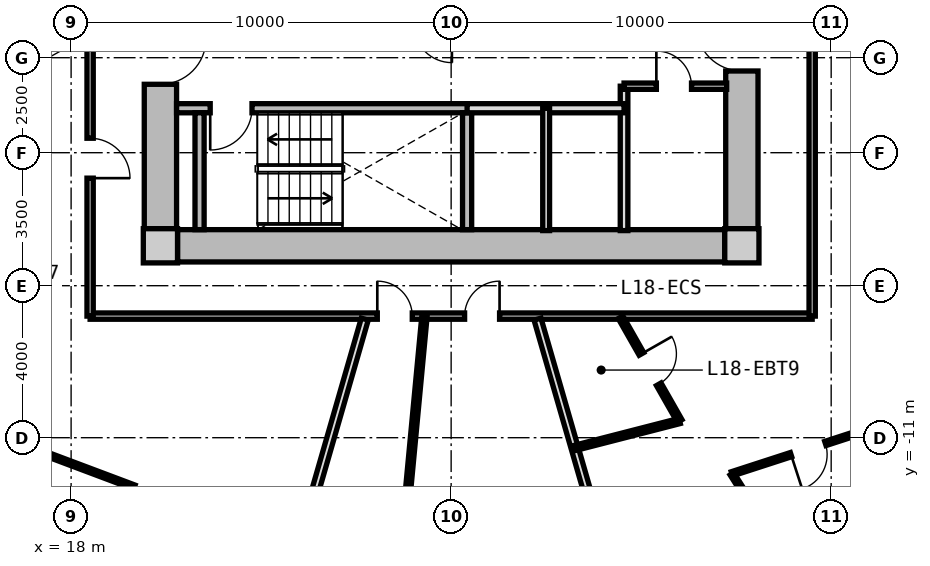
"""IFC4 building model, lengths in metres.
Left out: names, types, materials, properties, quantities, classifications, styles, units other than length and angle.
Written with IfcOpenShell. Run it as: python <this file> out.ifc"""

import sys

from ifc_helpers import new_model, si_unit, direction, frame, frame_2d, origin, origin_2d, place, context, subcontext, project, spatial, rectangle, extrude, source, transform, mapped, element, fill, save


model = new_model("IFC4")
c1 = context("Model", 3, precision=1e-05, world=origin(), true_north=direction((0.0, 1.0)))
c2 = subcontext(c1, "Body", "Model", "MODEL_VIEW")
j1 = project(units=[si_unit("LENGTHUNIT", "METRE"), si_unit("PLANEANGLEUNIT", "RADIAN")], contexts=[c1])
p1 = place(None, origin())
s1 = spatial("IfcSite", under=j1, at=p1, CompositionType="ELEMENT")
p2 = place(p1, origin())
s2 = spatial("IfcBuilding", under=s1, at=p2, CompositionType="ELEMENT")
p3 = place(p2, frame((0.0, 0.0, 61.25)))
s3 = spatial("IfcBuildingStorey", under=s2, at=p3, CompositionType="ELEMENT", Elevation=61.25)
m1 = source(origin(), c2, "Body", "SweptSolid", [
    extrude(rectangle(XDim=0.9, YDim=0.9, at=origin_2d()), origin(), (0.0, 0.0, 1.0), 3.05),
])
for number, where, z_axis, x_axis in (
    (1, (20.35, -5.95, 0.0), (0.0, 0.0, 1.0), (1.0, 0.0, 0.0)),
    (2, (35.65, -5.95, 0.0), (0.0, 0.0, 1.0), (1.0, 0.0, 0.0)),
):
    element("IfcColumn", number, at=place(p3, frame(where, z_axis=z_axis, x_axis=x_axis)), inside=s3, PredefinedType="COLUMN", context=c2, shape_type="MappedRepresentation", body=[
        mapped(m1, transform((0.0, 0.0, 0.0), x_axis=(1.0, 0.0, 0.0), y_axis=(0.0, 1.0, 0.0), z_axis=(0.0, 0.0, 1.0), scale=1.0)),
    ])
m2 = source(origin(), c2, "Body", "SweptSolid", [
    extrude(rectangle(XDim=14.4, YDim=0.85, at=frame_2d((7.2, 0.0))), origin(), (0.0, 0.0, 1.0), 2.79),
])
p4 = place(p3, frame((35.2, -5.95, 0.0), z_axis=(0.0, 0.0, 1.0), x_axis=(-1.0, 0.0, 0.0)))
e3 = element("IfcWall", 3, at=p4, inside=s3, PredefinedType="SHEAR", context=c2, shape_type="MappedRepresentation", body=[
    mapped(m2, transform((0.0, 0.0, 0.0), x_axis=(1.0, 0.0, 0.0), y_axis=(0.0, 1.0, 0.0), z_axis=(0.0, 0.0, 1.0), scale=1.0)),
])
m3 = source(origin(), c2, "Body", "SweptSolid", [
    extrude(rectangle(XDim=11.0, YDim=0.85, at=frame_2d((5.5, 0.0))), origin(), (0.0, 0.0, 1.0), 2.79),
])
p5 = place(p3, frame((20.35, -5.5, 0.0), z_axis=(0.0, 0.0, 1.0), x_axis=(0.0, 1.0, 0.0)))
e4 = element("IfcWall", 4, at=p5, inside=s3, PredefinedType="SHEAR", context=c2, shape_type="MappedRepresentation", body=[
    mapped(m3, transform((0.0, 0.0, 0.0), x_axis=(1.0, 0.0, 0.0), y_axis=(0.0, 1.0, 0.0), z_axis=(0.0, 0.0, 1.0), scale=1.0)),
])
p6 = place(p5, frame((3.8, 0.0, 0.0)))
e5 = element("IfcOpeningElement", 5, at=p6, cuts=e4, PredefinedType="OPENING", context=c2, shape_type="SweptSolid", body=[
    extrude(rectangle(XDim=1.2, YDim=2.15, at=frame_2d((0.6, 1.075))), frame((0.0, 0.435, 0.0), z_axis=(0.0, -1.0, 0.0), x_axis=(1.0, 0.0, 0.0)), (0.0, 0.0, 1.0), 0.87),
])
p7 = place(p3, frame((35.65, 5.5, 0.0), z_axis=(0.0, 0.0, 1.0), x_axis=(0.0, -1.0, 0.0)))
e6 = element("IfcWall", 6, at=p7, inside=s3, PredefinedType="SHEAR", context=c2, shape_type="MappedRepresentation", body=[
    mapped(m3, transform((0.0, 0.0, 0.0), x_axis=(1.0, 0.0, 0.0), y_axis=(0.0, 1.0, 0.0), z_axis=(0.0, 0.0, 1.0), scale=1.0)),
])
p8 = place(p7, frame((5.65, 0.0, 0.0)))
e7 = element("IfcOpeningElement", 7, at=p8, cuts=e6, PredefinedType="OPENING", context=c2, shape_type="SweptSolid", body=[
    extrude(rectangle(XDim=1.2, YDim=2.15, at=frame_2d((0.6, 1.075))), frame((0.0, 0.435, 0.0), z_axis=(0.0, -1.0, 0.0), x_axis=(1.0, 0.0, 0.0)), (0.0, 0.0, 1.0), 0.87),
])
m4 = source(origin(), c2, "Body", "SweptSolid", [
    extrude(rectangle(XDim=7.765, YDim=0.24, at=frame_2d((3.883, 0.0))), origin(), (0.0, 0.0, 1.0), 2.79),
])
p9 = place(p3, frame((20.775, -2.33, 0.0), z_axis=(0.0, 0.0, 1.0), x_axis=(1.0, 0.0, 0.0)))
e8 = element("IfcWall", 8, at=p9, inside=s3, PredefinedType="PARTITIONING", context=c2, shape_type="MappedRepresentation", body=[
    mapped(m4, transform((0.0, 0.0, 0.0), x_axis=(1.0, 0.0, 0.0), y_axis=(0.0, 1.0, 0.0), z_axis=(0.0, 0.0, 1.0), scale=1.0)),
])
p10 = place(p9, frame((0.885, 0.0, 0.0)))
e9 = element("IfcOpeningElement", 9, at=p10, cuts=e8, PredefinedType="OPENING", context=c2, shape_type="SweptSolid", body=[
    extrude(rectangle(XDim=1.1, YDim=2.15, at=frame_2d((0.55, 1.075))), frame((0.0, 0.13, 0.0), z_axis=(0.0, -1.0, 0.0), x_axis=(1.0, 0.0, 0.0)), (0.0, 0.0, 1.0), 0.26),
])
m5 = source(origin(), c2, "Body", "SweptSolid", [
    extrude(rectangle(XDim=3.075, YDim=0.24, at=frame_2d((1.538, 0.0))), origin(), (0.0, 0.0, 1.0), 2.79),
])
for number, where, z_axis, x_axis in (
    (10, (21.38, -5.525, 0.0), (0.0, 0.0, 1.0), (0.0, 1.0, 0.0)),
    (11, (28.42, -5.525, 0.0), (0.0, 0.0, 1.0), (0.0, 1.0, 0.0)),
):
    element("IfcWall", number, at=place(p3, frame(where, z_axis=z_axis, x_axis=x_axis)), inside=s3, PredefinedType="PARTITIONING", context=c2, shape_type="MappedRepresentation", body=[
        mapped(m5, transform((0.0, 0.0, 0.0), x_axis=(1.0, 0.0, 0.0), y_axis=(0.0, 1.0, 0.0), z_axis=(0.0, 0.0, 1.0), scale=1.0)),
    ])
m6 = source(origin(), c2, "Body", "SweptSolid", [
    extrude(rectangle(XDim=3.8, YDim=0.2, at=frame_2d((1.9, 0.0))), origin(), (0.0, 0.0, 1.0), 2.775),
])
p11 = place(p3, frame((32.55, -5.55, 0.0), z_axis=(0.0, 0.0, 1.0), x_axis=(0.0, 1.0, 0.0)))
e12 = element("IfcWall", 12, at=p11, inside=s3, PredefinedType="PARTITIONING", context=c2, shape_type="MappedRepresentation", body=[
    mapped(m6, transform((0.0, 0.0, 0.0), x_axis=(1.0, 0.0, 0.0), y_axis=(0.0, 1.0, 0.0), z_axis=(0.0, 0.0, 1.0), scale=1.0)),
])
m7 = source(origin(), c2, "Body", "SweptSolid", [
    extrude(rectangle(XDim=4.13, YDim=0.24, at=frame_2d((2.065, 0.0))), origin(), (0.0, 0.0, 1.0), 2.775),
])
p12 = place(p3, frame((28.42, -2.33, 0.0), z_axis=(0.0, 0.0, 1.0), x_axis=(1.0, 0.0, 0.0)))
e13 = element("IfcWall", 13, at=p12, inside=s3, PredefinedType="PARTITIONING", context=c2, shape_type="MappedRepresentation", body=[
    mapped(m7, transform((0.0, 0.0, 0.0), x_axis=(1.0, 0.0, 0.0), y_axis=(0.0, 1.0, 0.0), z_axis=(0.0, 0.0, 1.0), scale=1.0)),
])
m8 = source(origin(), c2, "Body", "SweptSolid", [
    extrude(rectangle(XDim=3.22, YDim=0.18, at=frame_2d((1.61, 0.0))), origin(), (0.0, 0.0, 1.0), 2.775),
])
p13 = place(p3, frame((30.5, -5.55, 0.0), z_axis=(0.0, 0.0, 1.0), x_axis=(0.0, 1.0, 0.0)))
e14 = element("IfcWall", 14, at=p13, inside=s3, PredefinedType="PARTITIONING", context=c2, shape_type="MappedRepresentation", body=[
    mapped(m8, transform((0.0, 0.0, 0.0), x_axis=(1.0, 0.0, 0.0), y_axis=(0.0, 1.0, 0.0), z_axis=(0.0, 0.0, 1.0), scale=1.0)),
])
m9 = source(origin(), c2, "Body", "SweptSolid", [
    extrude(rectangle(XDim=2.7, YDim=0.165, at=frame_2d((1.35, 0.0))), origin(), (0.0, 0.0, 1.0), 2.775),
])
p14 = place(p3, frame((32.55, -1.75, 0.0), z_axis=(0.0, 0.0, 1.0), x_axis=(1.0, 0.0, 0.0)))
e15 = element("IfcWall", 15, at=p14, inside=s3, PredefinedType="PARTITIONING", context=c2, shape_type="MappedRepresentation", body=[
    mapped(m9, transform((0.0, 0.0, 0.0), x_axis=(1.0, 0.0, 0.0), y_axis=(0.0, 1.0, 0.0), z_axis=(0.0, 0.0, 1.0), scale=1.0)),
])
p15 = place(p14, frame((0.85, 0.0, 0.0)))
e16 = element("IfcOpeningElement", 16, at=p15, cuts=e15, PredefinedType="OPENING", context=c2, shape_type="SweptSolid", body=[
    extrude(rectangle(XDim=0.925, YDim=2.1, at=frame_2d((0.462, 1.05))), frame((0.0, 0.093, 0.0), z_axis=(0.0, -1.0, 0.0), x_axis=(1.0, 0.0, 0.0)), (0.0, 0.0, 1.0), 0.185),
])
m10 = source(origin(), c2, "Body", "SweptSolid", [
    extrude(rectangle(XDim=19.0, YDim=0.165, at=frame_2d((9.5, 0.0))), origin(), (0.0, 0.0, 1.0), 2.775),
])
p16 = place(p3, frame((37.5, -7.8, 0.0), z_axis=(0.0, 0.0, 1.0), x_axis=(-1.0, 0.0, 0.0)))
e17 = element("IfcWall", 17, at=p16, inside=s3, PredefinedType="PARTITIONING", context=c2, shape_type="MappedRepresentation", body=[
    mapped(m10, transform((0.0, 0.0, 0.0), x_axis=(1.0, 0.0, 0.0), y_axis=(0.0, 1.0, 0.0), z_axis=(0.0, 0.0, 1.0), scale=1.0)),
])
p17 = place(p16, frame((10.523, 0.0, 0.0)))
e18 = element("IfcOpeningElement", 18, at=p17, cuts=e17, PredefinedType="OPENING", context=c2, shape_type="SweptSolid", body=[
    extrude(rectangle(XDim=0.92, YDim=2.1, at=frame_2d((0.46, 1.05))), frame((0.0, 0.093, 0.0), z_axis=(0.0, -1.0, 0.0), x_axis=(1.0, 0.0, 0.0)), (0.0, 0.0, 1.0), 0.185),
])
p18 = place(p16, frame((8.226, 0.0, 0.0)))
e19 = element("IfcOpeningElement", 19, at=p18, cuts=e17, PredefinedType="OPENING", context=c2, shape_type="SweptSolid", body=[
    extrude(rectangle(XDim=0.92, YDim=2.1, at=frame_2d((0.46, 1.05))), frame((0.0, 0.093, 0.0), z_axis=(0.0, -1.0, 0.0), x_axis=(1.0, 0.0, 0.0)), (0.0, 0.0, 1.0), 0.185),
])
m11 = source(origin(), c2, "Body", "SweptSolid", [
    extrude(rectangle(XDim=15.6, YDim=0.165, at=frame_2d((7.8, 0.0))), origin(), (0.0, 0.0, 1.0), 2.775),
])
p19 = place(p3, frame((18.5, -7.8, 0.0), z_axis=(0.0, 0.0, 1.0), x_axis=(0.0, 1.0, 0.0)))
e20 = element("IfcWall", 20, at=p19, inside=s3, PredefinedType="PARTITIONING", context=c2, shape_type="MappedRepresentation", body=[
    mapped(m11, transform((0.0, 0.0, 0.0), x_axis=(1.0, 0.0, 0.0), y_axis=(0.0, 1.0, 0.0), z_axis=(0.0, 0.0, 1.0), scale=1.0)),
])
p20 = place(p19, frame((3.63, 0.0, 0.0)))
e21 = element("IfcOpeningElement", 21, at=p20, cuts=e20, PredefinedType="OPENING", context=c2, shape_type="SweptSolid", body=[
    extrude(rectangle(XDim=1.05, YDim=2.15, at=frame_2d((0.525, 1.075))), frame((0.0, 0.093, 0.0), z_axis=(0.0, -1.0, 0.0), x_axis=(1.0, 0.0, 0.0)), (0.0, 0.0, 1.0), 0.185),
])
p21 = place(p3, frame((37.5, 7.8, 0.0), z_axis=(0.0, 0.0, 1.0), x_axis=(0.0, -1.0, 0.0)))
e22 = element("IfcWall", 22, at=p21, inside=s3, PredefinedType="PARTITIONING", context=c2, shape_type="MappedRepresentation", body=[
    mapped(m11, transform((0.0, 0.0, 0.0), x_axis=(1.0, 0.0, 0.0), y_axis=(0.0, 1.0, 0.0), z_axis=(0.0, 0.0, 1.0), scale=1.0)),
])
p22 = place(p21, frame((7.275, 0.0, 0.0)))
e23 = element("IfcOpeningElement", 23, at=p22, cuts=e22, PredefinedType="OPENING", context=c2, shape_type="SweptSolid", body=[
    extrude(rectangle(XDim=1.05, YDim=2.15, at=frame_2d((0.525, 1.075))), frame((0.0, 0.093, 0.0), z_axis=(0.0, -1.0, 0.0), x_axis=(1.0, 0.0, 0.0)), (0.0, 0.0, 1.0), 0.185),
])
m12 = source(origin(), c2, "Body", "SweptSolid", [
    extrude(rectangle(XDim=10.196, YDim=0.19, at=frame_2d((5.098, 0.0))), origin(), (0.0, 0.0, 1.0), 2.225),
])
p23 = place(p3, frame((25.727, -7.88, 0.0), z_axis=(0.0, 0.0, 1.0), x_axis=(-0.277136420347, -0.960830580549, 0.0)))
e24 = element("IfcWall", 24, at=p23, inside=s3, PredefinedType="PARTITIONING", context=c2, shape_type="MappedRepresentation", body=[
    mapped(m12, transform((0.0, 0.0, 0.0), x_axis=(1.0, 0.0, 0.0), y_axis=(0.0, 1.0, 0.0), z_axis=(0.0, 0.0, 1.0), scale=1.0)),
])
m13 = source(origin(), c2, "Body", "SweptSolid", [
    extrude(rectangle(XDim=8.32, YDim=0.115, at=frame_2d((4.16, 0.0))), origin(), (0.0, 0.0, 1.0), 2.775),
])
p24 = place(p3, frame((16.214, -11.006, 0.0), z_axis=(0.0, 0.0, 1.0), x_axis=(0.936180763098, -0.351518959382, 0.0)))
e25 = element("IfcWall", 25, at=p24, inside=s3, PredefinedType="PARTITIONING", context=c2, shape_type="MappedRepresentation", body=[
    mapped(m13, transform((0.0, 0.0, 0.0), x_axis=(1.0, 0.0, 0.0), y_axis=(0.0, 1.0, 0.0), z_axis=(0.0, 0.0, 1.0), scale=1.0)),
])
p25 = place(p24, frame((3.685, 0.0, 0.0)))
e26 = element("IfcOpeningElement", 26, at=p25, cuts=e25, PredefinedType="OPENING", context=c2, shape_type="SweptSolid", body=[
    extrude(rectangle(XDim=0.95, YDim=2.1, at=frame_2d((0.475, 1.05))), frame((0.0, 0.067, 0.0), z_axis=(0.0, -1.0, 0.0), x_axis=(1.0, 0.0, 0.0)), (0.0, 0.0, 1.0), 0.135),
])
p26 = place(p3, frame((30.273, -7.88, 0.0), z_axis=(0.0, 0.0, 1.0), x_axis=(0.277136420347, -0.960830580549, 0.0)))
e27 = element("IfcWall", 27, at=p26, inside=s3, PredefinedType="PARTITIONING", context=c2, shape_type="MappedRepresentation", body=[
    mapped(m12, transform((0.0, 0.0, 0.0), x_axis=(1.0, 0.0, 0.0), y_axis=(0.0, 1.0, 0.0), z_axis=(0.0, 0.0, 1.0), scale=1.0)),
])
m14 = source(origin(), c2, "Body", "SweptSolid", [
    extrude(rectangle(XDim=9.89, YDim=0.14, at=frame_2d((4.945, 0.0))), origin(), (0.0, 0.0, 1.0), 2.775),
])
p27 = place(p3, frame((27.296, -7.83, 0.0), z_axis=(0.0, 0.0, 1.0), x_axis=(-0.093780403478, -0.995592906726, 0.0)))
e28 = element("IfcWall", 28, at=p27, inside=s3, PredefinedType="PARTITIONING", context=c2, shape_type="MappedRepresentation", body=[
    mapped(m14, transform((0.0, 0.0, 0.0), x_axis=(1.0, 0.0, 0.0), y_axis=(0.0, 1.0, 0.0), z_axis=(0.0, 0.0, 1.0), scale=1.0)),
])
m15 = source(origin(), c2, "Body", "SweptSolid", [
    extrude(rectangle(XDim=3.141, YDim=0.14, at=frame_2d((1.571, 0.0))), origin(), (0.0, 0.0, 1.0), 2.775),
])
p28 = place(p3, frame((32.458, -7.83, 0.0), z_axis=(0.0, 0.0, 1.0), x_axis=(0.494874486088, -0.868964465913, 0.0)))
e29 = element("IfcWall", 29, at=p28, inside=s3, PredefinedType="PARTITIONING", context=c2, shape_type="MappedRepresentation", body=[
    mapped(m15, transform((0.0, 0.0, 0.0), x_axis=(1.0, 0.0, 0.0), y_axis=(0.0, 1.0, 0.0), z_axis=(0.0, 0.0, 1.0), scale=1.0)),
])
p29 = place(p28, frame((1.111, 0.0, 0.0)))
e30 = element("IfcOpeningElement", 30, at=p29, cuts=e29, PredefinedType="OPENING", context=c2, shape_type="SweptSolid", body=[
    extrude(rectangle(XDim=0.92, YDim=2.1, at=frame_2d((0.46, 1.05))), frame((0.0, 0.08, 0.0), z_axis=(0.0, -1.0, 0.0), x_axis=(1.0, 0.0, 0.0)), (0.0, 0.0, 1.0), 0.16),
])
m16 = source(origin(), c2, "Body", "SweptSolid", [
    extrude(rectangle(XDim=2.868, YDim=0.14, at=frame_2d((1.434, 0.0))), origin(), (0.0, 0.0, 1.0), 2.775),
])
p30 = place(p3, frame((34.013, -10.56, 0.0), z_axis=(0.0, 0.0, 1.0), x_axis=(-0.968467705195, -0.249139125778, 0.0)))
e31 = element("IfcWall", 31, at=p30, inside=s3, PredefinedType="PARTITIONING", context=c2, shape_type="MappedRepresentation", body=[
    mapped(m16, transform((0.0, 0.0, 0.0), x_axis=(1.0, 0.0, 0.0), y_axis=(0.0, 1.0, 0.0), z_axis=(0.0, 0.0, 1.0), scale=1.0)),
])
m17 = source(origin(), c2, "Body", "SweptSolid", [
    extrude(rectangle(XDim=3.974, YDim=0.115, at=frame_2d((1.987, 0.0))), origin(), (0.0, 0.0, 1.0), 2.775),
])
p31 = place(p3, frame((35.389, -11.95, 0.0), z_axis=(0.0, 0.0, 1.0), x_axis=(0.534810918023, -0.844971764003, 0.0)))
e32 = element("IfcWall", 32, at=p31, inside=s3, PredefinedType="PARTITIONING", context=c2, shape_type="MappedRepresentation", body=[
    mapped(m17, transform((0.0, 0.0, 0.0), x_axis=(1.0, 0.0, 0.0), y_axis=(0.0, 1.0, 0.0), z_axis=(0.0, 0.0, 1.0), scale=1.0)),
])
m18 = source(origin(), c2, "Body", "SweptSolid", [
    extrude(rectangle(XDim=4.22, YDim=0.115, at=frame_2d((2.11, 0.0))), origin(), (0.0, 0.0, 1.0), 2.775),
])
p32 = place(p3, frame((35.389, -11.95, 0.0), z_axis=(0.0, 0.0, 1.0), x_axis=(0.951130539873, 0.308789080315, 0.0)))
e33 = element("IfcWall", 33, at=p32, inside=s3, PredefinedType="PARTITIONING", context=c2, shape_type="MappedRepresentation", body=[
    mapped(m18, transform((0.0, 0.0, 0.0), x_axis=(1.0, 0.0, 0.0), y_axis=(0.0, 1.0, 0.0), z_axis=(0.0, 0.0, 1.0), scale=1.0)),
])
p33 = place(p32, frame((1.635, 0.0, 0.0)))
e34 = element("IfcOpeningElement", 34, at=p33, cuts=e33, PredefinedType="OPENING", context=c2, shape_type="SweptSolid", body=[
    extrude(rectangle(XDim=0.95, YDim=2.1, at=frame_2d((0.475, 1.05))), frame((0.0, 0.067, 0.0), z_axis=(0.0, -1.0, 0.0), x_axis=(1.0, 0.0, 0.0)), (0.0, 0.0, 1.0), 0.135),
])
m19 = source(origin(), c2, "Body", "SweptSolid", [
    extrude(rectangle(XDim=1.1, YDim=2.15, at=frame_2d((0.55, 1.075))), frame((0.0, 0.025, 0.0), z_axis=(0.0, -1.0, 0.0), x_axis=(1.0, 0.0, 0.0)), (0.0, 0.0, 1.0), 0.05),
])
p34 = place(p10, frame((1.1, 0.0, 0.0), z_axis=(0.0, 0.0, 1.0), x_axis=(-1.0, 0.0, 0.0)))
e35 = element("IfcDoor", 35, at=p34, inside=s3, OperationType="SINGLE_SWING_RIGHT", PredefinedType="DOOR", context=c2, shape_type="MappedRepresentation", body=[
    mapped(m19, transform((0.0, 0.0, 0.0), x_axis=(1.0, 0.0, 0.0), y_axis=(0.0, 1.0, 0.0), z_axis=(0.0, 0.0, 1.0), scale=1.0)),
])
fill(e9, e35)
m20 = source(origin(), c2, "Body", "SweptSolid", [
    extrude(rectangle(XDim=1.2, YDim=2.15, at=frame_2d((0.6, 1.075))), frame((0.0, 0.025, 0.0), z_axis=(0.0, -1.0, 0.0), x_axis=(1.0, 0.0, 0.0)), (0.0, 0.0, 1.0), 0.05),
])
p35 = place(p6, frame((1.2, 0.0, 0.0), z_axis=(0.0, 0.0, 1.0), x_axis=(-1.0, 0.0, 0.0)))
e36 = element("IfcDoor", 36, at=p35, inside=s3, OperationType="SINGLE_SWING_LEFT", PredefinedType="DOOR", context=c2, shape_type="MappedRepresentation", body=[
    mapped(m20, transform((0.0, 0.0, 0.0), x_axis=(1.0, 0.0, 0.0), y_axis=(0.0, 1.0, 0.0), z_axis=(0.0, 0.0, 1.0), scale=1.0)),
])
fill(e5, e36)
p36 = place(p8, frame((1.2, 0.0, 0.0), z_axis=(0.0, 0.0, 1.0), x_axis=(-1.0, 0.0, 0.0)))
e37 = element("IfcDoor", 37, at=p36, inside=s3, OperationType="SINGLE_SWING_RIGHT", PredefinedType="DOOR", context=c2, shape_type="MappedRepresentation", body=[
    mapped(m20, transform((0.0, 0.0, 0.0), x_axis=(1.0, 0.0, 0.0), y_axis=(0.0, 1.0, 0.0), z_axis=(0.0, 0.0, 1.0), scale=1.0)),
])
fill(e7, e37)
m21 = source(origin(), c2, "Body", "SweptSolid", [
    extrude(rectangle(XDim=0.925, YDim=2.1, at=frame_2d((0.462, 1.05))), frame((0.0, 0.025, 0.0), z_axis=(0.0, -1.0, 0.0), x_axis=(1.0, 0.0, 0.0)), (0.0, 0.0, 1.0), 0.05),
])
p37 = place(p15, origin())
e38 = element("IfcDoor", 38, at=p37, inside=s3, OperationType="SINGLE_SWING_LEFT", PredefinedType="DOOR", context=c2, shape_type="MappedRepresentation", body=[
    mapped(m21, transform((0.0, 0.0, 0.0), x_axis=(1.0, 0.0, 0.0), y_axis=(0.0, 1.0, 0.0), z_axis=(0.0, 0.0, 1.0), scale=1.0)),
])
fill(e16, e38)
m22 = source(origin(), c2, "Body", "SweptSolid", [
    extrude(rectangle(XDim=1.05, YDim=2.15, at=frame_2d((0.525, 1.075))), frame((0.0, 0.025, 0.0), z_axis=(0.0, -1.0, 0.0), x_axis=(1.0, 0.0, 0.0)), (0.0, 0.0, 1.0), 0.05),
])
p38 = place(p20, frame((1.05, 0.0, 0.0), z_axis=(0.0, 0.0, 1.0), x_axis=(-1.0, 0.0, 0.0)))
e39 = element("IfcDoor", 39, at=p38, inside=s3, OperationType="SINGLE_SWING_RIGHT", PredefinedType="DOOR", context=c2, shape_type="MappedRepresentation", body=[
    mapped(m22, transform((0.0, 0.0, 0.0), x_axis=(1.0, 0.0, 0.0), y_axis=(0.0, 1.0, 0.0), z_axis=(0.0, 0.0, 1.0), scale=1.0)),
])
fill(e21, e39)
m23 = source(origin(), c2, "Body", "SweptSolid", [
    extrude(rectangle(XDim=0.92, YDim=2.1, at=frame_2d((0.46, 1.05))), frame((0.0, 0.025, 0.0), z_axis=(0.0, -1.0, 0.0), x_axis=(1.0, 0.0, 0.0)), (0.0, 0.0, 1.0), 0.05),
])
p39 = place(p17, frame((0.92, 0.0, 0.0), z_axis=(0.0, 0.0, 1.0), x_axis=(-1.0, 0.0, 0.0)))
e40 = element("IfcDoor", 40, at=p39, inside=s3, OperationType="SINGLE_SWING_LEFT", PredefinedType="DOOR", context=c2, shape_type="MappedRepresentation", body=[
    mapped(m23, transform((0.0, 0.0, 0.0), x_axis=(1.0, 0.0, 0.0), y_axis=(0.0, 1.0, 0.0), z_axis=(0.0, 0.0, 1.0), scale=1.0)),
])
fill(e18, e40)
p40 = place(p18, frame((0.92, 0.0, 0.0), z_axis=(0.0, 0.0, 1.0), x_axis=(-1.0, 0.0, 0.0)))
e41 = element("IfcDoor", 41, at=p40, inside=s3, OperationType="SINGLE_SWING_RIGHT", PredefinedType="DOOR", context=c2, shape_type="MappedRepresentation", body=[
    mapped(m23, transform((0.0, 0.0, 0.0), x_axis=(1.0, 0.0, 0.0), y_axis=(0.0, 1.0, 0.0), z_axis=(0.0, 0.0, 1.0), scale=1.0)),
])
fill(e19, e41)
p41 = place(p29, origin())
e42 = element("IfcDoor", 42, at=p41, inside=s3, OperationType="SINGLE_SWING_LEFT", PredefinedType="DOOR", context=c2, shape_type="MappedRepresentation", body=[
    mapped(m23, transform((0.0, 0.0, 0.0), x_axis=(1.0, 0.0, 0.0), y_axis=(0.0, 1.0, 0.0), z_axis=(0.0, 0.0, 1.0), scale=1.0)),
])
fill(e30, e42)
m24 = source(origin(), c2, "Body", "SweptSolid", [
    extrude(rectangle(XDim=0.95, YDim=2.1, at=frame_2d((0.475, 1.05))), frame((0.0, 0.025, 0.0), z_axis=(0.0, -1.0, 0.0), x_axis=(1.0, 0.0, 0.0)), (0.0, 0.0, 1.0), 0.05),
])
p42 = place(p33, frame((0.95, 0.0, 0.0), z_axis=(0.0, 0.0, 1.0), x_axis=(-1.0, 0.0, 0.0)))
e43 = element("IfcDoor", 43, at=p42, inside=s3, OperationType="SINGLE_SWING_RIGHT", PredefinedType="DOOR", context=c2, shape_type="MappedRepresentation", body=[
    mapped(m24, transform((0.0, 0.0, 0.0), x_axis=(1.0, 0.0, 0.0), y_axis=(0.0, 1.0, 0.0), z_axis=(0.0, 0.0, 1.0), scale=1.0)),
])
fill(e34, e43)
save(model, sys.argv[1])
